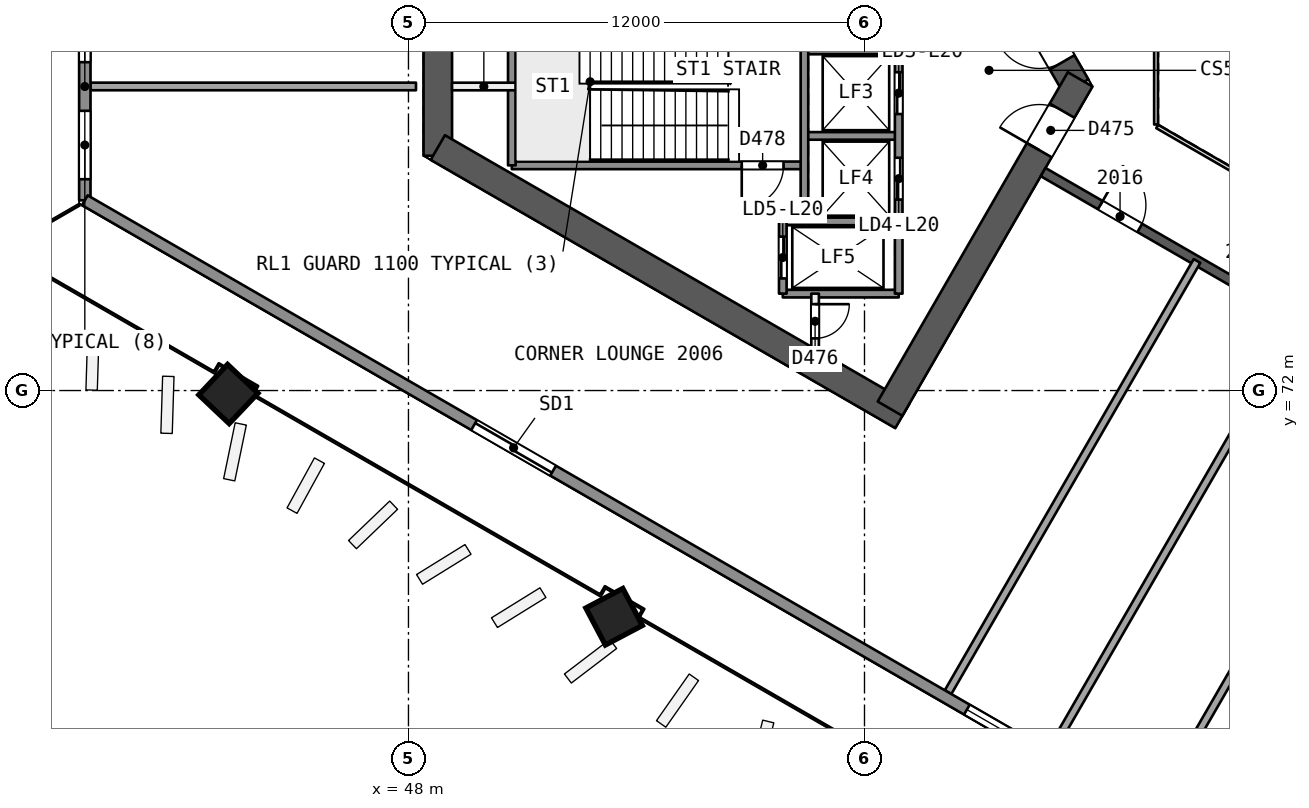
"""IFC4 building model, lengths in metres.
Left out: names, types, materials, properties, quantities, classifications, styles, units other than length and angle.
Written with IfcOpenShell. Run it as: python <this file> out.ifc"""

import sys

from ifc_helpers import new_model, si_unit, direction, frame, frame_2d, origin, origin_2d, place, context, subcontext, project, spatial, rectangle, extrude, element, fill, save


model = new_model("IFC4")
c1 = context("Model", 3, precision=1e-05, world=origin(), true_north=direction((0.0, 1.0)))
c2 = subcontext(c1, "Body", "Model", "MODEL_VIEW")
j1 = project(units=[si_unit("LENGTHUNIT", "METRE"), si_unit("PLANEANGLEUNIT", "RADIAN")], contexts=[c1])
p1 = place(None, origin())
s1 = spatial("IfcSite", under=j1, at=p1, CompositionType="ELEMENT")
p2 = place(p1, origin())
s2 = spatial("IfcBuilding", under=s1, at=p2, CompositionType="ELEMENT")
p3 = place(p2, frame((0.0, 0.0, 86.9)))
s3 = spatial("IfcBuildingStorey", under=s2, at=p3, CompositionType="ELEMENT", Elevation=86.9)
p4 = place(p3, frame((65.567, 80.0, 0.0), z_axis=(0.0, 0.0, 1.0), x_axis=(-0.499988615364, 0.866031976607, 0.0)))
e1 = element("IfcWall", 1, at=p4, inside=s3, PredefinedType="SHEAR", context=c2, shape_type="SweptSolid", body=[
    extrude(rectangle(XDim=10.163, YDim=0.75, at=frame_2d((5.082, 0.0))), origin(), (0.0, 0.0, 1.0), 3.7),
])
p5 = place(p4, frame((0.733, 0.0, 0.0)))
e2 = element("IfcOpeningElement", 2, at=p5, cuts=e1, PredefinedType="OPENING", context=c2, shape_type="SweptSolid", body=[
    extrude(rectangle(XDim=1.2, YDim=2.1, at=frame_2d((0.6, 1.05))), frame((0.0, 0.385, 0.0), z_axis=(0.0, -1.0, 0.0), x_axis=(1.0, 0.0, 0.0)), (0.0, 0.0, 1.0), 0.771),
])
p6 = place(p3, frame((48.772, 81.606, 0.0), z_axis=(0.0, 0.0, 1.0), x_axis=(0.0, -1.0, 0.0)))
e3 = element("IfcWall", 3, at=p6, inside=s3, PredefinedType="SHEAR", context=c2, shape_type="SweptSolid", body=[
    extrude(rectangle(XDim=3.429, YDim=0.75, at=frame_2d((1.714, 0.0))), origin(), (0.0, 0.0, 1.0), 3.7),
])
p7 = place(p3, frame((48.772, 78.394, 0.0), z_axis=(0.0, 0.0, 1.0), x_axis=(0.866028339916, -0.499994914436, 0.0)))
e4 = element("IfcWall", 4, at=p7, inside=s3, PredefinedType="SHEAR", context=c2, shape_type="SweptSolid", body=[
    extrude(rectangle(XDim=14.117, YDim=0.75, at=frame_2d((7.059, 0.0))), origin(), (0.0, 0.0, 1.0), 3.7),
])
p8 = place(p3, frame((60.673, 71.523, 0.0), z_axis=(0.0, 0.0, 1.0), x_axis=(0.499997052475, 0.866027105532, 0.0)))
e5 = element("IfcWall", 5, at=p8, inside=s3, PredefinedType="SHEAR", context=c2, shape_type="SweptSolid", body=[
    extrude(rectangle(XDim=10.005, YDim=0.75, at=frame_2d((5.002, 0.0))), origin(), (0.0, 0.0, 1.0), 3.7),
])
p9 = place(p8, frame((7.855, 0.0, 0.0)))
e6 = element("IfcOpeningElement", 6, at=p9, cuts=e5, PredefinedType="OPENING", context=c2, shape_type="SweptSolid", body=[
    extrude(rectangle(XDim=1.2, YDim=2.1, at=frame_2d((0.6, 1.05))), frame((0.0, 0.385, 0.0), z_axis=(0.0, -1.0, 0.0), x_axis=(1.0, 0.0, 0.0)), (0.0, 0.0, 1.0), 0.771),
])
p10 = place(p3, frame((64.7, 77.748, 0.0), z_axis=(0.0, 0.0, 1.0), x_axis=(0.866026492143, -0.499998114903, 0.0)))
e7 = element("IfcWall", 7, at=p10, inside=s3, PredefinedType="SHEAR", context=c2, shape_type="SweptSolid", body=[
    extrude(rectangle(XDim=15.588, YDim=0.25, at=frame_2d((7.794, 0.0))), origin(), (0.0, 0.0, 1.0), 3.2),
])
p11 = place(p10, frame((1.738, 0.0, 0.0)))
e8 = element("IfcOpeningElement", 8, at=p11, cuts=e7, PredefinedType="OPENING", context=c2, shape_type="SweptSolid", body=[
    extrude(rectangle(XDim=1.2, YDim=2.4, at=frame_2d((0.6, 1.2))), frame((0.0, 0.135, 0.0), z_axis=(0.0, -1.0, 0.0), x_axis=(1.0, 0.0, 0.0)), (0.0, 0.0, 1.0), 0.271),
])
p12 = place(p10, frame((5.785, 0.0, 0.0)))
e9 = element("IfcOpeningElement", 9, at=p12, cuts=e7, PredefinedType="OPENING", context=c2, shape_type="SweptSolid", body=[
    extrude(rectangle(XDim=0.9, YDim=2.1, at=frame_2d((0.45, 1.05))), frame((0.0, 0.135, 0.0), z_axis=(0.0, -1.0, 0.0), x_axis=(1.0, 0.0, 0.0)), (0.0, 0.0, 1.0), 0.271),
])
p13 = place(p10, frame((8.903, 0.0, 0.0)))
e10 = element("IfcOpeningElement", 10, at=p13, cuts=e7, PredefinedType="OPENING", context=c2, shape_type="SweptSolid", body=[
    extrude(rectangle(XDim=0.9, YDim=2.1, at=frame_2d((0.45, 1.05))), frame((0.0, 0.135, 0.0), z_axis=(0.0, -1.0, 0.0), x_axis=(1.0, 0.0, 0.0)), (0.0, 0.0, 1.0), 0.271),
])
p14 = place(p10, frame((12.75, 0.0, 0.0)))
e11 = element("IfcOpeningElement", 11, at=p14, cuts=e7, PredefinedType="OPENING", context=c2, shape_type="SweptSolid", body=[
    extrude(rectangle(XDim=1.0, YDim=2.1, at=frame_2d((0.5, 1.05))), frame((0.0, 0.135, 0.0), z_axis=(0.0, -1.0, 0.0), x_axis=(1.0, 0.0, 0.0)), (0.0, 0.0, 1.0), 0.271),
])
p15 = place(p3, frame((43.227, 71.9, 0.0), z_axis=(0.028557232129, 0.006793059837, 0.999569076568), x_axis=(-0.865318806464, 0.500768292431, 0.021318547709)))
e12 = element("IfcColumn", 12, at=p15, inside=s3, PredefinedType="COLUMN", context=c2, shape_type="SweptSolid", body=[
    extrude(rectangle(XDim=1.1, YDim=1.1, at=origin_2d()), origin(), (0.0, 0.0, 1.0), 3.702),
])
p16 = place(p3, frame((53.388, 66.033, 0.0), z_axis=(0.019327226818, 0.01220319782, 0.999738736004), x_axis=(-0.866906119736, 0.49835710069, 0.010676130209)))
e13 = element("IfcColumn", 13, at=p16, inside=s3, PredefinedType="COLUMN", context=c2, shape_type="SweptSolid", body=[
    extrude(rectangle(XDim=1.1, YDim=1.1, at=origin_2d()), origin(), (0.0, 0.0, 1.0), 3.701),
])
p17 = place(p3, frame((39.633, 80.001, 0.0), z_axis=(0.0, 0.0, 1.0), x_axis=(1.0, 0.0, 0.0)))
e14 = element("IfcWall", 14, at=p17, inside=s3, PredefinedType="PARTITIONING", context=c2, shape_type="SweptSolid", body=[
    extrude(rectangle(XDim=8.565, YDim=0.2, at=frame_2d((4.283, 0.0))), origin(), (0.0, 0.0, 1.0), 3.2),
])
for number, where, z_axis, x_axis in (
    (15, (62.199, 64.063, 0.0), (0.0, 0.0, 1.0), (0.5, 0.866, 0.0)),
    (16, (64.899, 62.504, 0.0), (0.0, 0.0, 1.0), (0.5, 0.866, 0.0)),
    (17, (67.599, 60.946, 0.0), (0.0, 0.0, 1.0), (0.5, 0.866, 0.0)),
):
    element("IfcWall", number, at=place(p3, frame(where, z_axis=z_axis, x_axis=x_axis)), inside=s3, PredefinedType="PARTITIONING", context=c2, shape_type="SweptSolid", body=[
        extrude(rectangle(XDim=13.102, YDim=0.2, at=frame_2d((6.551, 0.0))), origin(), (0.0, 0.0, 1.0), 3.2),
    ])
p18 = place(p3, frame((39.484, 77.006, 0.0), z_axis=(0.0, 0.0, 1.0), x_axis=(0.0, 1.0, 0.0)))
e18 = element("IfcWall", 18, at=p18, inside=s3, PredefinedType="SOLIDWALL", context=c2, shape_type="SweptSolid", body=[
    extrude(rectangle(XDim=5.988, YDim=0.3, at=frame_2d((2.994, 0.0))), origin(), (0.0, 0.0, 1.0), 3.2),
])
p19 = place(p18, frame((0.554, 0.0, 0.9)))
e19 = element("IfcOpeningElement", 19, at=p19, cuts=e18, PredefinedType="OPENING", context=c2, shape_type="SweptSolid", body=[
    extrude(rectangle(XDim=1.8, YDim=1.5, at=frame_2d((0.9, 0.75))), frame((0.0, 0.161, 0.0), z_axis=(0.0, -1.0, 0.0), x_axis=(1.0, 0.0, 0.0)), (0.0, 0.0, 1.0), 0.321),
])
p20 = place(p18, frame((3.634, 0.0, 0.9)))
e20 = element("IfcOpeningElement", 20, at=p20, cuts=e18, PredefinedType="OPENING", context=c2, shape_type="SweptSolid", body=[
    extrude(rectangle(XDim=1.8, YDim=1.5, at=frame_2d((0.9, 0.75))), frame((0.0, 0.161, 0.0), z_axis=(0.0, -1.0, 0.0), x_axis=(1.0, 0.0, 0.0)), (0.0, 0.0, 1.0), 0.321),
])
p21 = place(p3, frame((90.165, 47.745, 0.0), z_axis=(0.0, 0.0, 1.0), x_axis=(-0.866025940441, 0.499999070483, 0.0)))
e21 = element("IfcWall", 21, at=p21, inside=s3, PredefinedType="SOLIDWALL", context=c2, shape_type="SweptSolid", body=[
    extrude(rectangle(XDim=58.522, YDim=0.3, at=frame_2d((29.261, 0.0))), origin(), (0.0, 0.0, 1.0), 3.2),
])
p22 = place(p21, frame((44.294, 0.0, 0.0)))
e22 = element("IfcOpeningElement", 22, at=p22, cuts=e21, PredefinedType="OPENING", context=c2, shape_type="SweptSolid", body=[
    extrude(rectangle(XDim=2.4, YDim=2.4, at=frame_2d((1.2, 1.2))), frame((0.0, 0.161, 0.0), z_axis=(0.0, -1.0, 0.0), x_axis=(1.0, 0.0, 0.0)), (0.0, 0.0, 1.0), 0.321),
])
p23 = place(p21, frame((22.605, 0.0, 0.0)))
e23 = element("IfcOpeningElement", 23, at=p23, cuts=e21, PredefinedType="OPENING", context=c2, shape_type="SweptSolid", body=[
    extrude(rectangle(XDim=2.4, YDim=2.4, at=frame_2d((1.2, 1.2))), frame((0.0, 0.161, 0.0), z_axis=(0.0, -1.0, 0.0), x_axis=(1.0, 0.0, 0.0)), (0.0, 0.0, 1.0), 0.321),
])
p24 = place(p21, frame((10.658, 0.0, 0.0)))
e24 = element("IfcOpeningElement", 24, at=p24, cuts=e21, PredefinedType="OPENING", context=c2, shape_type="SweptSolid", body=[
    extrude(rectangle(XDim=2.4, YDim=2.4, at=frame_2d((1.2, 1.2))), frame((0.0, 0.161, 0.0), z_axis=(0.0, -1.0, 0.0), x_axis=(1.0, 0.0, 0.0)), (0.0, 0.0, 1.0), 0.321),
])
p25 = place(p21, frame((29.92, 0.0, 0.9)))
e25 = element("IfcOpeningElement", 25, at=p25, cuts=e21, PredefinedType="OPENING", context=c2, shape_type="SweptSolid", body=[
    extrude(rectangle(XDim=1.8, YDim=1.5, at=frame_2d((0.9, 0.75))), frame((0.0, 0.161, 0.0), z_axis=(0.0, -1.0, 0.0), x_axis=(1.0, 0.0, 0.0)), (0.0, 0.0, 1.0), 0.321),
])
p26 = place(p21, frame((26.802, 0.0, 0.9)))
e26 = element("IfcOpeningElement", 26, at=p26, cuts=e21, PredefinedType="OPENING", context=c2, shape_type="SweptSolid", body=[
    extrude(rectangle(XDim=1.8, YDim=1.5, at=frame_2d((0.9, 0.75))), frame((0.0, 0.161, 0.0), z_axis=(0.0, -1.0, 0.0), x_axis=(1.0, 0.0, 0.0)), (0.0, 0.0, 1.0), 0.321),
])
p27 = place(p3, frame((60.9, 80.95, 0.0), z_axis=(0.0, 0.0, 1.0), x_axis=(-1.0, 0.0, 0.0)))
e27 = element("IfcWall", 27, at=p27, inside=s3, PredefinedType="SOLIDWALL", context=c2, shape_type="SweptSolid", body=[
    extrude(rectangle(XDim=2.48, YDim=0.2, at=frame_2d((1.24, 0.0))), origin(), (0.0, 0.0, 1.0), 3.2),
])
p28 = place(p3, frame((50.82, 80.0, 0.0), z_axis=(0.0, 0.0, 1.0), x_axis=(-1.0, 0.0, 0.0)))
e28 = element("IfcWall", 28, at=p28, inside=s3, PredefinedType="PARTITIONING", context=c2, shape_type="SweptSolid", body=[
    extrude(rectangle(XDim=1.673, YDim=0.2, at=frame_2d((0.836, 0.0))), origin(), (0.0, 0.0, 1.0), 3.2),
])
p29 = place(p3, frame((60.9, 78.7, 0.0), z_axis=(0.0, 0.0, 1.0), x_axis=(-1.0, 0.0, 0.0)))
e29 = element("IfcWall", 29, at=p29, inside=s3, PredefinedType="SOLIDWALL", context=c2, shape_type="SweptSolid", body=[
    extrude(rectangle(XDim=2.48, YDim=0.2, at=frame_2d((1.24, 0.0))), origin(), (0.0, 0.0, 1.0), 3.2),
])
p30 = place(p3, frame((58.42, 77.925, 0.0), z_axis=(0.0, 0.0, 1.0), x_axis=(-1.0, 0.0, 0.0)))
e30 = element("IfcWall", 30, at=p30, inside=s3, PredefinedType="SOLIDWALL", context=c2, shape_type="SweptSolid", body=[
    extrude(rectangle(XDim=7.7, YDim=0.2, at=frame_2d((3.85, 0.0))), origin(), (0.0, 0.0, 1.0), 3.2),
])
p31 = place(p30, frame((0.55, 0.0, 0.0)))
e31 = element("IfcOpeningElement", 31, at=p31, cuts=e30, PredefinedType="OPENING", context=c2, shape_type="SweptSolid", body=[
    extrude(rectangle(XDim=1.1, YDim=2.1, at=frame_2d((0.55, 1.05))), frame((0.0, 0.11, 0.0), z_axis=(0.0, -1.0, 0.0), x_axis=(1.0, 0.0, 0.0)), (0.0, 0.0, 1.0), 0.221),
])
for number, where, z_axis, x_axis in (
    (32, (60.9, 76.45, 0.0), (0.0, 0.0, 1.0), (-1.0, 0.0, 0.0)),
    (33, (60.9, 74.55, 0.0), (0.0, 0.0, 1.0), (-1.0, 0.0, 0.0)),
):
    element("IfcWall", number, at=place(p3, frame(where, z_axis=z_axis, x_axis=x_axis)), inside=s3, PredefinedType="SOLIDWALL", context=c2, shape_type="SweptSolid", body=[
        extrude(rectangle(XDim=3.05, YDim=0.2, at=frame_2d((1.525, 0.0))), origin(), (0.0, 0.0, 1.0), 3.2),
    ])
p32 = place(p3, frame((60.9, 85.45, 0.0), z_axis=(0.0, 0.0, 1.0), x_axis=(0.0, -1.0, 0.0)))
e34 = element("IfcWall", 34, at=p32, inside=s3, PredefinedType="SOLIDWALL", context=c2, shape_type="SweptSolid", body=[
    extrude(rectangle(XDim=10.9, YDim=0.2, at=frame_2d((5.45, 0.0))), origin(), (0.0, 0.0, 1.0), 3.2),
])
p33 = place(p32, frame((0.575, 0.0, 0.0)))
e35 = element("IfcOpeningElement", 35, at=p33, cuts=e34, PredefinedType="OPENING", context=c2, shape_type="SweptSolid", body=[
    extrude(rectangle(XDim=1.1, YDim=2.1, at=frame_2d((0.55, 1.05))), frame((0.0, 0.11, 0.0), z_axis=(0.0, -1.0, 0.0), x_axis=(1.0, 0.0, 0.0)), (0.0, 0.0, 1.0), 0.221),
])
p34 = place(p32, frame((2.825, 0.0, 0.0)))
e36 = element("IfcOpeningElement", 36, at=p34, cuts=e34, PredefinedType="OPENING", context=c2, shape_type="SweptSolid", body=[
    extrude(rectangle(XDim=1.1, YDim=2.1, at=frame_2d((0.55, 1.05))), frame((0.0, 0.11, 0.0), z_axis=(0.0, -1.0, 0.0), x_axis=(1.0, 0.0, 0.0)), (0.0, 0.0, 1.0), 0.221),
])
p35 = place(p32, frame((5.075, 0.0, 0.0)))
e37 = element("IfcOpeningElement", 37, at=p35, cuts=e34, PredefinedType="OPENING", context=c2, shape_type="SweptSolid", body=[
    extrude(rectangle(XDim=1.1, YDim=2.1, at=frame_2d((0.55, 1.05))), frame((0.0, 0.11, 0.0), z_axis=(0.0, -1.0, 0.0), x_axis=(1.0, 0.0, 0.0)), (0.0, 0.0, 1.0), 0.221),
])
p36 = place(p32, frame((7.325, 0.0, 0.0)))
e38 = element("IfcOpeningElement", 38, at=p36, cuts=e34, PredefinedType="OPENING", context=c2, shape_type="SweptSolid", body=[
    extrude(rectangle(XDim=1.1, YDim=2.1, at=frame_2d((0.55, 1.05))), frame((0.0, 0.11, 0.0), z_axis=(0.0, -1.0, 0.0), x_axis=(1.0, 0.0, 0.0)), (0.0, 0.0, 1.0), 0.221),
])
p37 = place(p3, frame((58.7, 74.55, 0.0), z_axis=(0.0, 0.0, 1.0), x_axis=(0.0, -1.0, 0.0)))
e39 = element("IfcWall", 39, at=p37, inside=s3, PredefinedType="PARTITIONING", context=c2, shape_type="SweptSolid", body=[
    extrude(rectangle(XDim=1.455, YDim=0.2, at=frame_2d((0.728, 0.0))), origin(), (0.0, 0.0, 1.0), 3.2),
])
p38 = place(p37, frame((0.278, 0.0, 0.0)))
e40 = element("IfcOpeningElement", 40, at=p38, cuts=e39, PredefinedType="OPENING", context=c2, shape_type="SweptSolid", body=[
    extrude(rectangle(XDim=0.9, YDim=2.1, at=frame_2d((0.45, 1.05))), frame((0.0, 0.11, 0.0), z_axis=(0.0, -1.0, 0.0), x_axis=(1.0, 0.0, 0.0)), (0.0, 0.0, 1.0), 0.221),
])
p39 = place(p3, frame((58.42, 85.45, 0.0), z_axis=(0.0, 0.0, 1.0), x_axis=(0.0, -1.0, 0.0)))
e41 = element("IfcWall", 41, at=p39, inside=s3, PredefinedType="SOLIDWALL", context=c2, shape_type="SweptSolid", body=[
    extrude(rectangle(XDim=9.0, YDim=0.2, at=frame_2d((4.5, 0.0))), origin(), (0.0, 0.0, 1.0), 3.2),
])
p40 = place(p3, frame((57.85, 76.45, 0.0), z_axis=(0.0, 0.0, 1.0), x_axis=(0.0, -1.0, 0.0)))
e42 = element("IfcWall", 42, at=p40, inside=s3, PredefinedType="SOLIDWALL", context=c2, shape_type="SweptSolid", body=[
    extrude(rectangle(XDim=1.9, YDim=0.2, at=frame_2d((0.95, 0.0))), origin(), (0.0, 0.0, 1.0), 3.2),
])
p41 = place(p40, frame((0.4, 0.0, 0.0)))
e43 = element("IfcOpeningElement", 43, at=p41, cuts=e42, PredefinedType="OPENING", context=c2, shape_type="SweptSolid", body=[
    extrude(rectangle(XDim=1.1, YDim=2.1, at=frame_2d((0.55, 1.05))), frame((0.0, 0.11, 0.0), z_axis=(0.0, -1.0, 0.0), x_axis=(1.0, 0.0, 0.0)), (0.0, 0.0, 1.0), 0.221),
])
p42 = place(p3, frame((50.72, 82.075, 0.0), z_axis=(0.0, 0.0, 1.0), x_axis=(0.0, -1.0, 0.0)))
e44 = element("IfcWall", 44, at=p42, inside=s3, PredefinedType="SOLIDWALL", context=c2, shape_type="SweptSolid", body=[
    extrude(rectangle(XDim=4.15, YDim=0.2, at=frame_2d((2.075, 0.0))), origin(), (0.0, 0.0, 1.0), 3.2),
])
p43 = place(p3, frame((67.672, 81.0, 0.0), z_axis=(0.0, 0.0, 1.0), x_axis=(0.0, -1.0, 0.0)))
e45 = element("IfcWall", 45, at=p43, inside=s3, PredefinedType="PARTITIONING", context=c2, shape_type="SweptSolid", body=[
    extrude(rectangle(XDim=2.0, YDim=0.1, at=frame_2d((1.0, 0.0))), origin(), (0.0, 0.0, 1.0), 3.2),
])
p44 = place(p3, frame((67.702, 78.948, 0.0), z_axis=(0.0, 0.0, 1.0), x_axis=(0.866026658274, -0.499997827154, 0.0)))
e46 = element("IfcWall", 46, at=p44, inside=s3, PredefinedType="PARTITIONING", context=c2, shape_type="SweptSolid", body=[
    extrude(rectangle(XDim=11.588, YDim=0.1, at=frame_2d((5.794, 0.0))), origin(), (0.0, 0.0, 1.0), 3.2),
])
p45 = place(p11, origin())
e47 = element("IfcDoor", 47, at=p45, inside=s3, OperationType="SINGLE_SWING_LEFT", PredefinedType="NOTDEFINED", context=c2, shape_type="SweptSolid", body=[
    extrude(rectangle(XDim=1.2, YDim=2.4, at=frame_2d((0.6, 1.2))), frame((0.0, 0.025, 0.0), z_axis=(0.0, -1.0, 0.0), x_axis=(1.0, 0.0, 0.0)), (0.0, 0.0, 1.0), 0.05),
])
fill(e8, e47)
p46 = place(p19, origin())
e48 = element("IfcWindow", 48, at=p46, inside=s3, PartitioningType="SINGLE_PANEL", PredefinedType="WINDOW", context=c2, shape_type="SweptSolid", body=[
    extrude(rectangle(XDim=1.8, YDim=1.5, at=frame_2d((0.9, 0.75))), frame((0.0, 0.03, 0.0), z_axis=(0.0, -1.0, 0.0), x_axis=(1.0, 0.0, 0.0)), (0.0, 0.0, 1.0), 0.06),
])
fill(e19, e48)
p47 = place(p20, origin())
e49 = element("IfcWindow", 49, at=p47, inside=s3, PartitioningType="SINGLE_PANEL", PredefinedType="WINDOW", context=c2, shape_type="SweptSolid", body=[
    extrude(rectangle(XDim=1.8, YDim=1.5, at=frame_2d((0.9, 0.75))), frame((0.0, 0.03, 0.0), z_axis=(0.0, -1.0, 0.0), x_axis=(1.0, 0.0, 0.0)), (0.0, 0.0, 1.0), 0.06),
])
fill(e20, e49)
p48 = place(p22, origin())
e50 = element("IfcDoor", 50, at=p48, inside=s3, OperationType="SLIDING_TO_LEFT", PredefinedType="NOTDEFINED", context=c2, shape_type="SweptSolid", body=[
    extrude(rectangle(XDim=2.4, YDim=2.4, at=frame_2d((1.2, 1.2))), frame((0.0, 0.025, 0.0), z_axis=(0.0, -1.0, 0.0), x_axis=(1.0, 0.0, 0.0)), (0.0, 0.0, 1.0), 0.05),
])
fill(e22, e50)
p49 = place(p25, origin())
e51 = element("IfcWindow", 51, at=p49, inside=s3, PartitioningType="SINGLE_PANEL", PredefinedType="WINDOW", context=c2, shape_type="SweptSolid", body=[
    extrude(rectangle(XDim=1.8, YDim=1.5, at=frame_2d((0.9, 0.75))), frame((0.0, 0.03, 0.0), z_axis=(0.0, -1.0, 0.0), x_axis=(1.0, 0.0, 0.0)), (0.0, 0.0, 1.0), 0.06),
])
fill(e25, e51)
p50 = place(p5, origin())
e52 = element("IfcDoor", 52, at=p50, inside=s3, OperationType="SINGLE_SWING_RIGHT", PredefinedType="NOTDEFINED", context=c2, shape_type="SweptSolid", body=[
    extrude(rectangle(XDim=1.2, YDim=2.1, at=frame_2d((0.6, 1.05))), frame((0.0, 0.025, 0.0), z_axis=(0.0, -1.0, 0.0), x_axis=(1.0, 0.0, 0.0)), (0.0, 0.0, 1.0), 0.05),
])
fill(e2, e52)
p51 = place(p9, origin())
e53 = element("IfcDoor", 53, at=p51, inside=s3, OperationType="SINGLE_SWING_LEFT", PredefinedType="NOTDEFINED", context=c2, shape_type="SweptSolid", body=[
    extrude(rectangle(XDim=1.2, YDim=2.1, at=frame_2d((0.6, 1.05))), frame((0.0, 0.025, 0.0), z_axis=(0.0, -1.0, 0.0), x_axis=(1.0, 0.0, 0.0)), (0.0, 0.0, 1.0), 0.05),
])
fill(e6, e53)
p52 = place(p35, origin())
e54 = element("IfcDoor", 54, at=p52, inside=s3, OperationType="SLIDING_TO_RIGHT", PredefinedType="NOTDEFINED", context=c2, shape_type="SweptSolid", body=[
    extrude(rectangle(XDim=1.1, YDim=2.1, at=frame_2d((0.55, 1.05))), frame((0.0, 0.025, 0.0), z_axis=(0.0, -1.0, 0.0), x_axis=(1.0, 0.0, 0.0)), (0.0, 0.0, 1.0), 0.05),
])
fill(e37, e54)
p53 = place(p36, origin())
e55 = element("IfcDoor", 55, at=p53, inside=s3, OperationType="SLIDING_TO_LEFT", PredefinedType="NOTDEFINED", context=c2, shape_type="SweptSolid", body=[
    extrude(rectangle(XDim=1.1, YDim=2.1, at=frame_2d((0.55, 1.05))), frame((0.0, 0.025, 0.0), z_axis=(0.0, -1.0, 0.0), x_axis=(1.0, 0.0, 0.0)), (0.0, 0.0, 1.0), 0.05),
])
fill(e38, e55)
p54 = place(p41, origin())
e56 = element("IfcDoor", 56, at=p54, inside=s3, OperationType="SLIDING_TO_RIGHT", PredefinedType="NOTDEFINED", context=c2, shape_type="SweptSolid", body=[
    extrude(rectangle(XDim=1.1, YDim=2.1, at=frame_2d((0.55, 1.05))), frame((0.0, 0.025, 0.0), z_axis=(0.0, -1.0, 0.0), x_axis=(1.0, 0.0, 0.0)), (0.0, 0.0, 1.0), 0.05),
])
fill(e43, e56)
p55 = place(p38, origin())
e57 = element("IfcDoor", 57, at=p55, inside=s3, OperationType="SINGLE_SWING_LEFT", PredefinedType="NOTDEFINED", context=c2, shape_type="SweptSolid", body=[
    extrude(rectangle(XDim=0.9, YDim=2.1, at=frame_2d((0.45, 1.05))), frame((0.0, 0.025, 0.0), z_axis=(0.0, -1.0, 0.0), x_axis=(1.0, 0.0, 0.0)), (0.0, 0.0, 1.0), 0.05),
])
fill(e40, e57)
p56 = place(p31, origin())
e58 = element("IfcDoor", 58, at=p56, inside=s3, OperationType="SINGLE_SWING_RIGHT", PredefinedType="NOTDEFINED", context=c2, shape_type="SweptSolid", body=[
    extrude(rectangle(XDim=1.1, YDim=2.1, at=frame_2d((0.55, 1.05))), frame((0.0, 0.025, 0.0), z_axis=(0.0, -1.0, 0.0), x_axis=(1.0, 0.0, 0.0)), (0.0, 0.0, 1.0), 0.05),
])
fill(e31, e58)
save(model, sys.argv[1])
